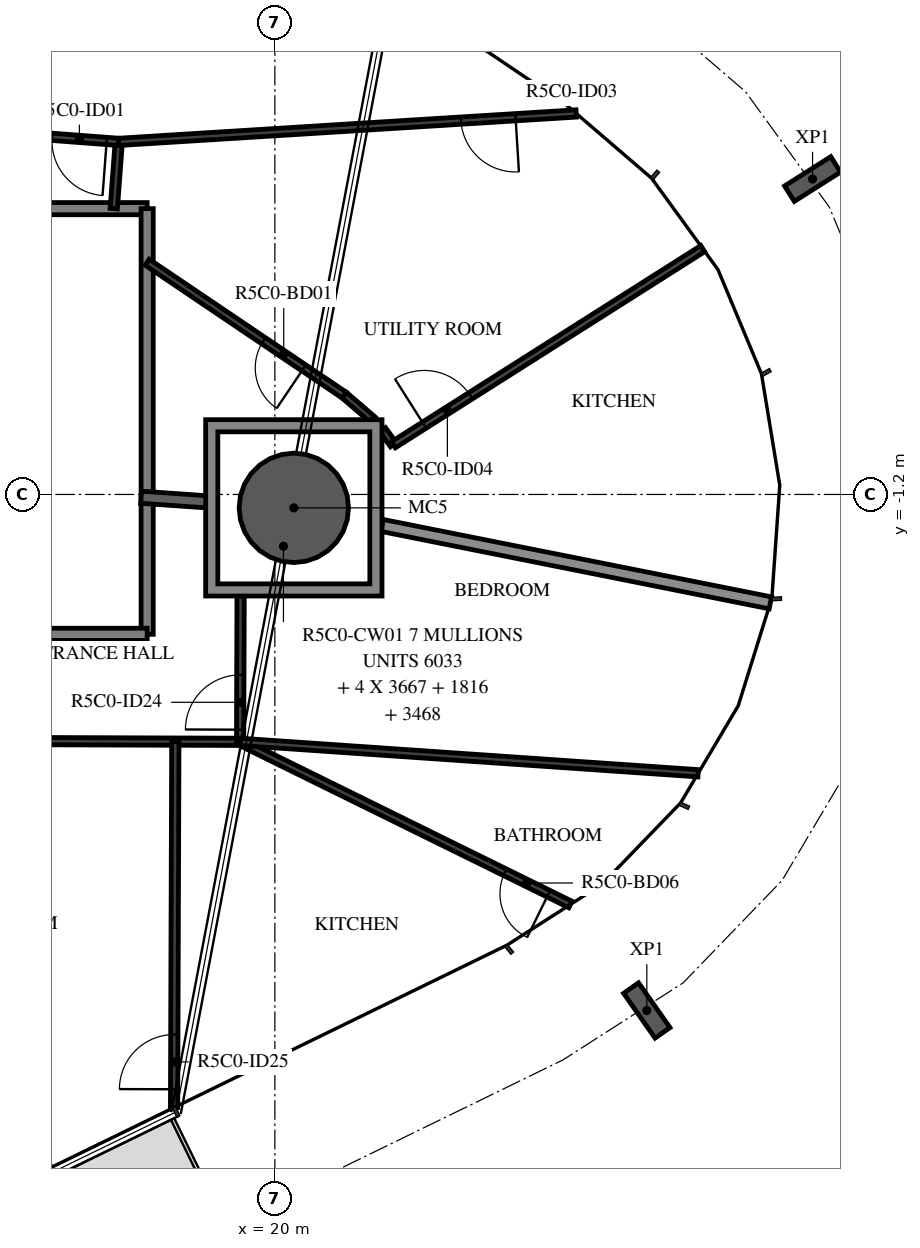
"""IFC4 building model, lengths in metres.
Left out: names, types, materials, properties, quantities, classifications, styles, units other than length and angle.
Written with IfcOpenShell. Run it as: python <this file> out.ifc"""

import sys

from ifc_helpers import new_model, si_unit, direction, frame, frame_2d, origin, origin_2d, place, context, subcontext, project, spatial, polyline, rectangle, hollow_circle, i_section, outline, extrude, element, fill, save


model = new_model("IFC4")
c1 = context("Model", 3, precision=1e-05, world=origin(), true_north=direction((0.0, 1.0)))
c2 = subcontext(c1, "Body", "Model", "MODEL_VIEW")
j1 = project(units=[si_unit("LENGTHUNIT", "METRE"), si_unit("PLANEANGLEUNIT", "RADIAN")], contexts=[c1])
p1 = place(None, origin())
s1 = spatial("IfcSite", under=j1, at=p1, CompositionType="ELEMENT")
p2 = place(p1, origin())
s2 = spatial("IfcBuilding", under=s1, at=p2, CompositionType="ELEMENT")
p3 = place(p2, frame((0.0, 0.0, 209.4)))
s3 = spatial("IfcBuildingStorey", under=s2, at=p3, CompositionType="ELEMENT", Elevation=209.4)
p4 = place(p3, frame((20.312, -1.42, -0.38), z_axis=(0.0, 0.0, 1.0), x_axis=(1.0, 0.0, 0.0)))
e1 = element("IfcColumn", 1, at=p4, inside=s3, PredefinedType="COLUMN", context=c2, shape_type="SweptSolid", body=[
    extrude(hollow_circle(Radius=0.9, WallThickness=0.04, at=origin_2d()), origin(), (0.0, 0.0, 1.0), 3.5),
])
for number, where, z_axis, x_axis in (
    (2, (26.117, -9.686, -0.38), (0.0, 0.0, 1.0), (-0.818, -0.575, 0.0)),
    (3, (28.842, 3.987, -0.38), (0.0, 0.0, 1.0), (0.535, -0.845, 0.0)),
):
    element("IfcColumn", number, at=place(p3, frame(where, z_axis=z_axis, x_axis=x_axis)), inside=s3, PredefinedType="COLUMN", context=c2, shape_type="SweptSolid", body=[
        extrude(i_section(OverallWidth=0.3, OverallDepth=0.9, WebThickness=0.019, FlangeThickness=0.035, FilletRadius=0.03, at=origin_2d()), origin(), (0.0, 0.0, 1.0), 3.5),
    ])
p5 = place(p3, frame((17.9, 3.5, 0.0), z_axis=(0.0, 0.0, 1.0), x_axis=(-1.0, 0.0, 0.0)))
e4 = element("IfcWall", 4, at=p5, inside=s3, PredefinedType="STANDARD", context=c2, shape_type="SweptSolid", body=[
    extrude(rectangle(XDim=4.698, YDim=0.2, at=frame_2d((2.349, 0.0))), origin(), (0.0, 0.0, 1.0), 3.12),
])
p6 = place(p3, frame((17.9, -3.5, 0.0), z_axis=(0.0, 0.0, 1.0), x_axis=(0.0, 1.0, 0.0)))
e5 = element("IfcWall", 5, at=p6, inside=s3, PredefinedType="STANDARD", context=c2, shape_type="SweptSolid", body=[
    extrude(rectangle(XDim=7.0, YDim=0.2, at=frame_2d((3.5, 0.0))), origin(), (0.0, 0.0, 1.0), 3.12),
])
p7 = place(p3, frame((13.188, -3.5, 0.0), z_axis=(0.0, 0.0, 1.0), x_axis=(1.0, 0.0, 0.0)))
e6 = element("IfcWall", 6, at=p7, inside=s3, PredefinedType="STANDARD", context=c2, shape_type="SweptSolid", body=[
    extrude(rectangle(XDim=4.712, YDim=0.2, at=frame_2d((2.356, 0.0))), origin(), (0.0, 0.0, 1.0), 3.12),
])
p8 = place(p3, frame((17.8, -1.246, 0.0), z_axis=(0.0, 0.0, 1.0), x_axis=(0.997562681713, -0.069776042122, 0.0)))
e7 = element("IfcWall", 7, at=p8, inside=s3, PredefinedType="STANDARD", context=c2, shape_type="SweptSolid", body=[
    extrude(rectangle(XDim=1.144, YDim=0.2, at=frame_2d((0.572, 0.0))), origin(), (0.0, 0.0, 1.0), 3.12),
])
p9 = place(p3, frame((21.762, -1.709, 0.0), z_axis=(0.0, 0.0, 1.0), x_axis=(0.980707365343, -0.195481619501, 0.0)))
e8 = element("IfcWall", 8, at=p9, inside=s3, PredefinedType="STANDARD", context=c2, shape_type="SweptSolid", body=[
    extrude(rectangle(XDim=6.512, YDim=0.2, at=frame_2d((3.256, 0.0))), origin(), (0.0, 0.0, 1.0), 2.73),
])
p10 = place(p3, frame((17.351, 3.5, 0.0), z_axis=(0.0, 0.0, 1.0), x_axis=(0.075374124137, 0.997155324616, 0.0)))
e9 = element("IfcWall", 9, at=p10, inside=s3, PredefinedType="PARTITIONING", context=c2, shape_type="SweptSolid", body=[
    extrude(rectangle(XDim=1.101, YDim=0.12, at=frame_2d((0.551, 0.0))), origin(), (0.0, 0.0, 1.0), 3.12),
])
p11 = place(p3, frame((17.434, 4.598, 0.0), z_axis=(0.0, 0.0, 1.0), x_axis=(-0.997152077354, 0.075417071205, 0.0)))
e10 = element("IfcWall", 10, at=p11, inside=s3, PredefinedType="PARTITIONING", context=c2, shape_type="SweptSolid", body=[
    extrude(rectangle(XDim=2.787, YDim=0.12, at=frame_2d((1.394, 0.0))), origin(), (0.0, 0.0, 1.0), 3.12),
])
p12 = place(p11, frame((0.2, 0.0, 0.0)))
e11 = element("IfcOpeningElement", 11, at=p12, cuts=e10, PredefinedType="OPENING", context=c2, shape_type="SweptSolid", body=[
    extrude(rectangle(XDim=0.9, YDim=2.1, at=frame_2d((0.45, 1.05))), frame((0.0, 0.07, 0.0), z_axis=(0.0, -1.0, 0.0), x_axis=(1.0, 0.0, 0.0)), (0.0, 0.0, 1.0), 0.14),
])
p13 = place(p3, frame((21.61, 0.03, 0.0), z_axis=(0.0, 0.0, 1.0), x_axis=(-0.758532196215, 0.651635563259, 0.0)))
e12 = element("IfcWall", 12, at=p13, inside=s3, PredefinedType="PARTITIONING", context=c2, shape_type="SweptSolid", body=[
    extrude(rectangle(XDim=0.619, YDim=0.12, at=frame_2d((0.31, 0.0))), origin(), (0.0, 0.0, 1.0), 3.12),
])
p14 = place(p3, frame((21.141, 0.433, 0.0), z_axis=(0.0, 0.0, 1.0), x_axis=(-0.829049908454, 0.559174614313, 0.0)))
e13 = element("IfcWall", 13, at=p14, inside=s3, PredefinedType="PARTITIONING", context=c2, shape_type="SweptSolid", body=[
    extrude(rectangle(XDim=3.909, YDim=0.12, at=frame_2d((1.955, 0.0))), origin(), (0.0, 0.0, 1.0), 3.12),
])
p15 = place(p14, frame((0.8, 0.0, 0.0)))
e14 = element("IfcOpeningElement", 14, at=p15, cuts=e13, PredefinedType="OPENING", context=c2, shape_type="SweptSolid", body=[
    extrude(rectangle(XDim=0.8, YDim=2.1, at=frame_2d((0.4, 1.05))), frame((0.0, 0.07, 0.0), z_axis=(0.0, -1.0, 0.0), x_axis=(1.0, 0.0, 0.0)), (0.0, 0.0, 1.0), 0.14),
])
p16 = place(p3, frame((24.956, 5.065, 0.0), z_axis=(0.0, 0.0, 1.0), x_axis=(-0.998076202118, -0.061999151332, 0.0)))
e15 = element("IfcWall", 15, at=p16, inside=s3, PredefinedType="PARTITIONING", context=c2, shape_type="SweptSolid", body=[
    extrude(rectangle(XDim=7.537, YDim=0.12, at=frame_2d((3.769, 0.0))), origin(), (0.0, 0.0, 1.0), 3.12),
])
p17 = place(p16, frame((1.0, 0.0, 0.0)))
e16 = element("IfcOpeningElement", 16, at=p17, cuts=e15, PredefinedType="OPENING", context=c2, shape_type="SweptSolid", body=[
    extrude(rectangle(XDim=0.9, YDim=2.1, at=frame_2d((0.45, 1.05))), frame((0.0, 0.07, 0.0), z_axis=(0.0, -1.0, 0.0), x_axis=(1.0, 0.0, 0.0)), (0.0, 0.0, 1.0), 0.14),
])
p18 = place(p3, frame((21.772, -0.136, 0.0), z_axis=(0.0, 0.0, 1.0), x_axis=(0.587310294779, -0.809361858285, 0.0)))
e17 = element("IfcWall", 17, at=p18, inside=s3, PredefinedType="PARTITIONING", context=c2, shape_type="SweptSolid", body=[
    extrude(rectangle(XDim=0.303, YDim=0.12, at=frame_2d((0.152, 0.0))), origin(), (0.0, 0.0, 1.0), 3.12),
])
p19 = place(p3, frame((21.95, -0.382, 0.0), z_axis=(0.0, 0.0, 1.0), x_axis=(0.844596663126, 0.535403097336, 0.0)))
e18 = element("IfcWall", 18, at=p19, inside=s3, PredefinedType="PARTITIONING", context=c2, shape_type="SweptSolid", body=[
    extrude(rectangle(XDim=6.022, YDim=0.12, at=frame_2d((3.011, 0.0))), origin(), (0.0, 0.0, 1.0), 2.73),
])
p20 = place(p19, frame((0.6, 0.0, 0.0)))
e19 = element("IfcOpeningElement", 19, at=p20, cuts=e18, PredefinedType="OPENING", context=c2, shape_type="SweptSolid", body=[
    extrude(rectangle(XDim=0.9, YDim=2.1, at=frame_2d((0.45, 1.05))), frame((0.0, 0.07, 0.0), z_axis=(0.0, -1.0, 0.0), x_axis=(1.0, 0.0, 0.0)), (0.0, 0.0, 1.0), 0.14),
])
p21 = place(p3, frame((14.431, -5.251, 0.0), z_axis=(0.0, 0.0, 1.0), x_axis=(0.999994153659, -0.003419451456, 0.0)))
e20 = element("IfcWall", 20, at=p21, inside=s3, PredefinedType="PARTITIONING", context=c2, shape_type="SweptSolid", body=[
    extrude(rectangle(XDim=4.998, YDim=0.12, at=frame_2d((2.499, 0.0))), origin(), (0.0, 0.0, 1.0), 3.12),
])
p22 = place(p3, frame((19.429, -5.268, 0.0), z_axis=(0.0, 0.0, 1.0), x_axis=(0.003360127656, 0.999994354755, 0.0)))
e21 = element("IfcWall", 21, at=p22, inside=s3, PredefinedType="PARTITIONING", context=c2, shape_type="SweptSolid", body=[
    extrude(rectangle(XDim=2.398, YDim=0.12, at=frame_2d((1.199, 0.0))), origin(), (0.0, 0.0, 1.0), 3.12),
])
p23 = place(p22, frame((0.2, 0.0, 0.0)))
e22 = element("IfcOpeningElement", 22, at=p23, cuts=e21, PredefinedType="OPENING", context=c2, shape_type="SweptSolid", body=[
    extrude(rectangle(XDim=0.9, YDim=2.1, at=frame_2d((0.45, 1.05))), frame((0.0, 0.07, 0.0), z_axis=(0.0, -1.0, 0.0), x_axis=(1.0, 0.0, 0.0)), (0.0, 0.0, 1.0), 0.14),
])
p24 = place(p3, frame((18.343, -11.282, 0.0), z_axis=(0.0, 0.0, 1.0), x_axis=(0.003448675073, 0.999994053302, 0.0)))
e23 = element("IfcWall", 23, at=p24, inside=s3, PredefinedType="PARTITIONING", context=c2, shape_type="SweptSolid", body=[
    extrude(rectangle(XDim=6.017, YDim=0.12, at=frame_2d((3.009, 0.0))), origin(), (0.0, 0.0, 1.0), 3.12),
])
p25 = place(p24, frame((0.3, 0.0, 0.0)))
e24 = element("IfcOpeningElement", 24, at=p25, cuts=e23, PredefinedType="OPENING", context=c2, shape_type="SweptSolid", body=[
    extrude(rectangle(XDim=0.9, YDim=2.1, at=frame_2d((0.45, 1.05))), frame((0.0, 0.07, 0.0), z_axis=(0.0, -1.0, 0.0), x_axis=(1.0, 0.0, 0.0)), (0.0, 0.0, 1.0), 0.14),
])
p26 = place(p3, frame((24.861, -7.943, 0.0), z_axis=(0.0, 0.0, 1.0), x_axis=(-0.897128390861, 0.441769906525, 0.0)))
e25 = element("IfcWall", 25, at=p26, inside=s3, PredefinedType="PARTITIONING", context=c2, shape_type="SweptSolid", body=[
    extrude(rectangle(XDim=6.055, YDim=0.12, at=frame_2d((3.027, 0.0))), origin(), (0.0, 0.0, 1.0), 3.12),
])
p27 = place(p26, frame((0.4, 0.0, 0.0)))
e26 = element("IfcOpeningElement", 26, at=p27, cuts=e25, PredefinedType="OPENING", context=c2, shape_type="SweptSolid", body=[
    extrude(rectangle(XDim=0.8, YDim=2.1, at=frame_2d((0.4, 1.05))), frame((0.0, 0.07, 0.0), z_axis=(0.0, -1.0, 0.0), x_axis=(1.0, 0.0, 0.0)), (0.0, 0.0, 1.0), 0.14),
])
p28 = place(p3, frame((26.961, -5.785, 0.0), z_axis=(0.0, 0.0, 1.0), x_axis=(-0.997652165985, 0.068484711466, 0.0)))
e27 = element("IfcWall", 27, at=p28, inside=s3, PredefinedType="PARTITIONING", context=c2, shape_type="SweptSolid", body=[
    extrude(rectangle(XDim=7.551, YDim=0.12, at=frame_2d((3.775, 0.0))), origin(), (0.0, 0.0, 1.0), 3.12),
])
p29 = place(p3, origin())
e28 = element("IfcWall", 28, at=p29, inside=s3, PredefinedType="STANDARD", context=c2, shape_type="SweptSolid", body=[
    extrude(outline(polyline([(21.762, 0.03), (21.762, -2.87), (18.862, -2.87), (18.862, 0.03), (21.762, 0.03)]), holes=[polyline([(19.062, -2.67), (21.562, -2.67), (21.562, -0.17), (19.062, -0.17), (19.062, -2.67)])]), origin(), (0.0, 0.0, 1.0), 3.12),
])
p30 = place(p12, origin())
e29 = element("IfcDoor", 29, at=p30, inside=s3, OperationType="SINGLE_SWING_LEFT", PredefinedType="DOOR", context=c2, shape_type="SweptSolid", body=[
    extrude(rectangle(XDim=0.9, YDim=2.1, at=frame_2d((0.45, 1.05))), frame((0.0, 0.025, 0.0), z_axis=(0.0, -1.0, 0.0), x_axis=(1.0, 0.0, 0.0)), (0.0, 0.0, 1.0), 0.05),
])
fill(e11, e29)
p31 = place(p17, origin())
e30 = element("IfcDoor", 30, at=p31, inside=s3, OperationType="SINGLE_SWING_LEFT", PredefinedType="DOOR", context=c2, shape_type="SweptSolid", body=[
    extrude(rectangle(XDim=0.9, YDim=2.1, at=frame_2d((0.45, 1.05))), frame((0.0, 0.025, 0.0), z_axis=(0.0, -1.0, 0.0), x_axis=(1.0, 0.0, 0.0)), (0.0, 0.0, 1.0), 0.05),
])
fill(e16, e30)
p32 = place(p15, origin())
e31 = element("IfcDoor", 31, at=p32, inside=s3, OperationType="SINGLE_SWING_RIGHT", PredefinedType="DOOR", context=c2, shape_type="SweptSolid", body=[
    extrude(rectangle(XDim=0.8, YDim=2.1, at=frame_2d((0.4, 1.05))), frame((0.0, 0.025, 0.0), z_axis=(0.0, -1.0, 0.0), x_axis=(1.0, 0.0, 0.0)), (0.0, 0.0, 1.0), 0.05),
])
fill(e14, e31)
p33 = place(p20, origin())
e32 = element("IfcDoor", 32, at=p33, inside=s3, OperationType="SINGLE_SWING_LEFT", PredefinedType="DOOR", context=c2, shape_type="SweptSolid", body=[
    extrude(rectangle(XDim=0.9, YDim=2.1, at=frame_2d((0.45, 1.05))), frame((0.0, 0.025, 0.0), z_axis=(0.0, -1.0, 0.0), x_axis=(1.0, 0.0, 0.0)), (0.0, 0.0, 1.0), 0.05),
])
fill(e19, e32)
p34 = place(p23, origin())
e33 = element("IfcDoor", 33, at=p34, inside=s3, OperationType="SINGLE_SWING_RIGHT", PredefinedType="DOOR", context=c2, shape_type="SweptSolid", body=[
    extrude(rectangle(XDim=0.9, YDim=2.1, at=frame_2d((0.45, 1.05))), frame((0.0, 0.025, 0.0), z_axis=(0.0, -1.0, 0.0), x_axis=(1.0, 0.0, 0.0)), (0.0, 0.0, 1.0), 0.05),
])
fill(e22, e33)
p35 = place(p25, origin())
e34 = element("IfcDoor", 34, at=p35, inside=s3, OperationType="SINGLE_SWING_RIGHT", PredefinedType="DOOR", context=c2, shape_type="SweptSolid", body=[
    extrude(rectangle(XDim=0.9, YDim=2.1, at=frame_2d((0.45, 1.05))), frame((0.0, 0.025, 0.0), z_axis=(0.0, -1.0, 0.0), x_axis=(1.0, 0.0, 0.0)), (0.0, 0.0, 1.0), 0.05),
])
fill(e24, e34)
p36 = place(p27, origin())
e35 = element("IfcDoor", 35, at=p36, inside=s3, OperationType="SINGLE_SWING_RIGHT", PredefinedType="DOOR", context=c2, shape_type="SweptSolid", body=[
    extrude(rectangle(XDim=0.8, YDim=2.1, at=frame_2d((0.4, 1.05))), frame((0.0, 0.025, 0.0), z_axis=(0.0, -1.0, 0.0), x_axis=(1.0, 0.0, 0.0)), (0.0, 0.0, 1.0), 0.05),
])
fill(e26, e35)
save(model, sys.argv[1])
